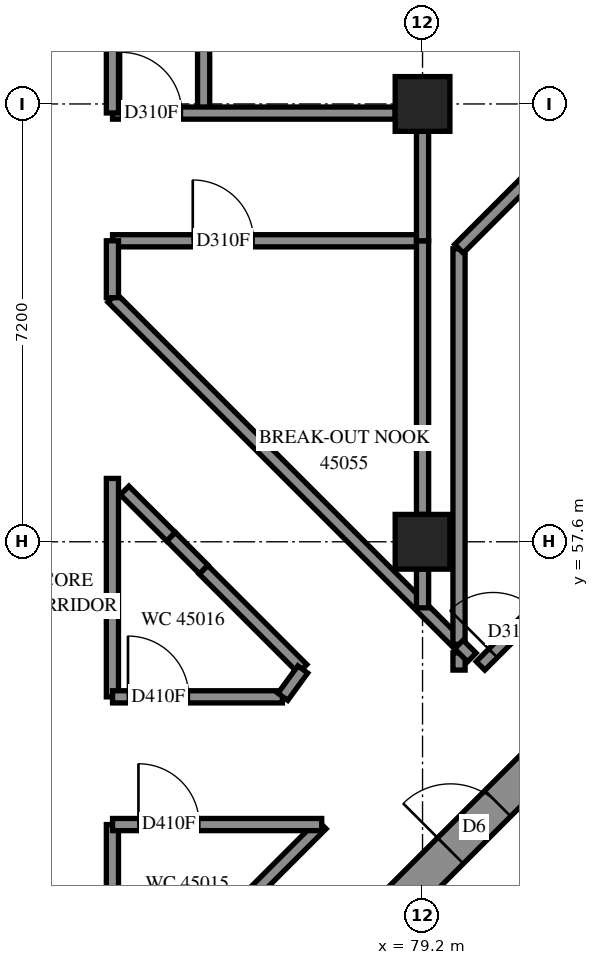
"""IFC4 building model, lengths in metres.
Left out: names, types, materials, properties, quantities, classifications, styles, units other than length and angle.
Written with IfcOpenShell. Run it as: python <this file> out.ifc"""

import sys

from ifc_helpers import new_model, si_unit, direction, frame, frame_2d, origin, origin_2d, place, context, subcontext, project, spatial, rectangle, extrude, element, fill, save


model = new_model("IFC4")
c1 = context("Model", 3, precision=1e-05, world=origin(), true_north=direction((0.0, 1.0)))
c2 = subcontext(c1, "Body", "Model", "MODEL_VIEW")
j1 = project(units=[si_unit("LENGTHUNIT", "METRE"), si_unit("PLANEANGLEUNIT", "RADIAN")], contexts=[c1])
p1 = place(None, origin())
s1 = spatial("IfcSite", under=j1, at=p1, CompositionType="ELEMENT")
p2 = place(p1, origin())
s2 = spatial("IfcBuilding", under=s1, at=p2, CompositionType="ELEMENT")
p3 = place(p2, frame((0.0, 0.0, 166.0)))
s3 = spatial("IfcBuildingStorey", under=s2, at=p3, CompositionType="ELEMENT", Elevation=166.0)
for number, where, z_axis, x_axis in (
    (1, (79.2, 57.6, 0.0), (0.0, 0.0, 1.0), (1.0, 0.0, 0.0)),
    (2, (79.2, 64.8, 0.0), (0.0, 0.0, 1.0), (1.0, 0.0, 0.0)),
):
    element("IfcColumn", number, at=place(p3, frame(where, z_axis=z_axis, x_axis=x_axis)), inside=s3, PredefinedType="COLUMN", context=c2, shape_type="SweptSolid", body=[
        extrude(rectangle(XDim=0.9, YDim=0.9, at=origin_2d()), origin(), (0.0, 0.0, 1.0), 3.1),
    ])
p4 = place(p3, frame((76.442, 49.302, -0.3), z_axis=(0.0, 0.0, 1.0), x_axis=(0.7071067812, 0.7071067812, 0.0)))
e3 = element("IfcWall", 3, at=p4, inside=s3, PredefinedType="SHEAR", context=c2, shape_type="SweptSolid", body=[
    extrude(rectangle(XDim=14.4, YDim=0.6, at=frame_2d((7.2, 0.0))), origin(), (0.0, 0.0, 1.0), 2.7),
])
p5 = place(p4, frame((4.55, 0.0, 0.3)))
e4 = element("IfcOpeningElement", 4, at=p5, cuts=e3, PredefinedType="OPENING", context=c2, shape_type="SweptSolid", body=[
    extrude(rectangle(XDim=1.1, YDim=2.1, at=frame_2d((0.55, 1.05))), frame((0.0, 0.31, 0.0), z_axis=(0.0, -1.0, 0.0), x_axis=(1.0, 0.0, 0.0)), (0.0, 0.0, 1.0), 0.62),
])
p6 = place(p4, frame((11.35, 0.0, 0.3)))
e5 = element("IfcOpeningElement", 5, at=p6, cuts=e3, PredefinedType="OPENING", context=c2, shape_type="SweptSolid", body=[
    extrude(rectangle(XDim=1.1, YDim=2.1, at=frame_2d((0.55, 1.05))), frame((0.0, 0.31, 0.0), z_axis=(0.0, -1.0, 0.0), x_axis=(1.0, 0.0, 0.0)), (0.0, 0.0, 1.0), 0.62),
])
p7 = place(p3, frame((80.154, 55.56, 0.0), z_axis=(0.0, 0.0, 1.0), x_axis=(0.7071067812, 0.7071067812, 0.0)))
e6 = element("IfcWall", 6, at=p7, inside=s3, PredefinedType="PARTITIONING", context=c2, shape_type="SweptSolid", body=[
    extrude(rectangle(XDim=9.45, YDim=0.2, at=frame_2d((4.725, 0.0))), origin(), (0.0, 0.0, 1.0), 3.1),
])
p8 = place(p7, frame((0.292, 0.0, 0.0)))
e7 = element("IfcOpeningElement", 7, at=p8, cuts=e6, PredefinedType="OPENING", context=c2, shape_type="SweptSolid", body=[
    extrude(rectangle(XDim=1.0, YDim=2.1, at=frame_2d((0.5, 1.05))), frame((0.0, 0.11, 0.0), z_axis=(0.0, -1.0, 0.0), x_axis=(1.0, 0.0, 0.0)), (0.0, 0.0, 1.0), 0.22),
])
p9 = place(p3, frame((75.6, 64.65, 0.0), z_axis=(0.0, 0.0, 1.0), x_axis=(0.0, 1.0, 0.0)))
e8 = element("IfcWall", 8, at=p9, inside=s3, PredefinedType="PARTITIONING", context=c2, shape_type="SweptSolid", body=[
    extrude(rectangle(XDim=8.16, YDim=0.2, at=frame_2d((4.08, 0.0))), origin(), (0.0, 0.0, 1.0), 3.1),
])
p10 = place(p3, frame((74.097, 61.611, 0.0), z_axis=(0.0, 0.0, 1.0), x_axis=(0.7071067812, -0.7071067812, 0.0)))
e9 = element("IfcWall", 9, at=p10, inside=s3, PredefinedType="PARTITIONING", context=c2, shape_type="SweptSolid", body=[
    extrude(rectangle(XDim=8.061, YDim=0.2, at=frame_2d((4.03, 0.0))), origin(), (0.0, 0.0, 1.0), 3.1),
])
p11 = place(p3, frame((79.8, 55.914, 0.0), z_axis=(0.0, 0.0, 1.0), x_axis=(0.0, 1.0, 0.0)))
e10 = element("IfcWall", 10, at=p11, inside=s3, PredefinedType="PARTITIONING", context=c2, shape_type="SweptSolid", body=[
    extrude(rectangle(XDim=6.504, YDim=0.2, at=frame_2d((3.252, 0.0))), origin(), (0.0, 0.0, 1.0), 3.1),
])
p12 = place(p3, frame((79.799, 62.419, 0.0), z_axis=(0.0, 0.0, 1.0), x_axis=(0.7071067812, 0.7071067812, 0.0)))
e11 = element("IfcWall", 11, at=p12, inside=s3, PredefinedType="PARTITIONING", context=c2, shape_type="SweptSolid", body=[
    extrude(rectangle(XDim=5.716, YDim=0.2, at=frame_2d((2.858, 0.0))), origin(), (0.0, 0.0, 1.0), 3.1),
])
p13 = place(p3, frame((74.102, 62.55, 0.0), z_axis=(0.0, 0.0, 1.0), x_axis=(1.0, 0.0, 0.0)))
e12 = element("IfcWall", 12, at=p13, inside=s3, PredefinedType="PARTITIONING", context=c2, shape_type="SweptSolid", body=[
    extrude(rectangle(XDim=5.098, YDim=0.2, at=frame_2d((2.549, 0.0))), origin(), (0.0, 0.0, 1.0), 3.1),
])
p14 = place(p13, frame((1.319, 0.0, 0.0)))
e13 = element("IfcOpeningElement", 13, at=p14, cuts=e12, PredefinedType="OPENING", context=c2, shape_type="SweptSolid", body=[
    extrude(rectangle(XDim=1.0, YDim=2.1, at=frame_2d((0.5, 1.05))), frame((0.0, 0.11, 0.0), z_axis=(0.0, -1.0, 0.0), x_axis=(1.0, 0.0, 0.0)), (0.0, 0.0, 1.0), 0.22),
])
p15 = place(p3, frame((74.102, 64.65, 0.0), z_axis=(0.0, 0.0, 1.0), x_axis=(1.0, 0.0, 0.0)))
e14 = element("IfcWall", 14, at=p15, inside=s3, PredefinedType="PARTITIONING", context=c2, shape_type="SweptSolid", body=[
    extrude(rectangle(XDim=4.648, YDim=0.2, at=frame_2d((2.324, 0.0))), origin(), (0.0, 0.0, 1.0), 3.1),
])
p16 = place(p15, frame((0.14, 0.0, 0.0)))
e15 = element("IfcOpeningElement", 15, at=p16, cuts=e14, PredefinedType="OPENING", context=c2, shape_type="SweptSolid", body=[
    extrude(rectangle(XDim=1.0, YDim=2.1, at=frame_2d((0.5, 1.05))), frame((0.0, 0.11, 0.0), z_axis=(0.0, -1.0, 0.0), x_axis=(1.0, 0.0, 0.0)), (0.0, 0.0, 1.0), 0.22),
])
p17 = place(p3, frame((74.3, 49.706, 0.0), z_axis=(0.0, 0.0, 1.0), x_axis=(0.7071067812, 0.7071067812, 0.0)))
e16 = element("IfcWall", 16, at=p17, inside=s3, PredefinedType="PARTITIONING", context=c2, shape_type="SweptSolid", body=[
    extrude(rectangle(XDim=4.588, YDim=0.2, at=frame_2d((2.294, 0.0))), origin(), (0.0, 0.0, 1.0), 3.1),
])
p18 = place(p3, frame((79.2, 58.05, 0.0), z_axis=(0.0, 0.0, 1.0), x_axis=(0.0, 1.0, 0.0)))
e17 = element("IfcWall", 17, at=p18, inside=s3, PredefinedType="PARTITIONING", context=c2, shape_type="SweptSolid", body=[
    extrude(rectangle(XDim=4.5, YDim=0.2, at=frame_2d((2.25, 0.0))), origin(), (0.0, 0.0, 1.0), 3.1),
])
p19 = place(p3, frame((74.1, 55.05, 0.0), z_axis=(0.0, 0.0, 1.0), x_axis=(0.0, 1.0, 0.0)))
e18 = element("IfcWall", 18, at=p19, inside=s3, PredefinedType="PARTITIONING", context=c2, shape_type="SweptSolid", body=[
    extrude(rectangle(XDim=3.592, YDim=0.2, at=frame_2d((1.796, 0.0))), origin(), (0.0, 0.0, 1.0), 3.1),
])
p20 = place(p3, frame((74.1, 49.508, 0.0), z_axis=(0.0, 0.0, 1.0), x_axis=(0.0, 1.0, 0.0)))
e19 = element("IfcWall", 19, at=p20, inside=s3, PredefinedType="PARTITIONING", context=c2, shape_type="SweptSolid", body=[
    extrude(rectangle(XDim=3.442, YDim=0.2, at=frame_2d((1.721, 0.0))), origin(), (0.0, 0.0, 1.0), 3.1),
])
p21 = place(p3, frame((74.102, 52.95, 0.0), z_axis=(0.0, 0.0, 1.0), x_axis=(1.0, 0.0, 0.0)))
e20 = element("IfcWall", 20, at=p21, inside=s3, PredefinedType="PARTITIONING", context=c2, shape_type="SweptSolid", body=[
    extrude(rectangle(XDim=3.44, YDim=0.2, at=frame_2d((1.72, 0.0))), origin(), (0.0, 0.0, 1.0), 3.1),
])
p22 = place(p21, frame((0.426, 0.0, 0.0)))
e21 = element("IfcOpeningElement", 21, at=p22, cuts=e20, PredefinedType="OPENING", context=c2, shape_type="SweptSolid", body=[
    extrude(rectangle(XDim=1.0, YDim=2.1, at=frame_2d((0.5, 1.05))), frame((0.0, 0.11, 0.0), z_axis=(0.0, -1.0, 0.0), x_axis=(1.0, 0.0, 0.0)), (0.0, 0.0, 1.0), 0.22),
])
p23 = place(p3, frame((74.102, 55.05, 0.0), z_axis=(0.0, 0.0, 1.0), x_axis=(1.0, 0.0, 0.0)))
e22 = element("IfcWall", 22, at=p23, inside=s3, PredefinedType="PARTITIONING", context=c2, shape_type="SweptSolid", body=[
    extrude(rectangle(XDim=2.794, YDim=0.2, at=frame_2d((1.397, 0.0))), origin(), (0.0, 0.0, 1.0), 3.1),
])
p24 = place(p23, frame((0.254, 0.0, 0.0)))
e23 = element("IfcOpeningElement", 23, at=p24, cuts=e22, PredefinedType="OPENING", context=c2, shape_type="SweptSolid", body=[
    extrude(rectangle(XDim=1.0, YDim=2.1, at=frame_2d((0.5, 1.05))), frame((0.0, 0.11, 0.0), z_axis=(0.0, -1.0, 0.0), x_axis=(1.0, 0.0, 0.0)), (0.0, 0.0, 1.0), 0.22),
])
p25 = place(p3, frame((75.597, 57.141, 0.0), z_axis=(0.0, 0.0, 1.0), x_axis=(0.7071067812, -0.7071067812, 0.0)))
e24 = element("IfcWall", 24, at=p25, inside=s3, PredefinedType="PARTITIONING", context=c2, shape_type="SweptSolid", body=[
    extrude(rectangle(XDim=2.305, YDim=0.2, at=frame_2d((1.153, 0.0))), origin(), (0.0, 0.0, 1.0), 3.1),
])
p26 = place(p3, frame((74.1, 64.652, 0.0), z_axis=(0.0, 0.0, 1.0), x_axis=(0.0, 1.0, 0.0)))
e25 = element("IfcWall", 25, at=p26, inside=s3, PredefinedType="PARTITIONING", context=c2, shape_type="SweptSolid", body=[
    extrude(rectangle(XDim=2.248, YDim=0.2, at=frame_2d((1.124, 0.0))), origin(), (0.0, 0.0, 1.0), 3.1),
])
p27 = place(p3, frame((79.2, 62.55, 0.0), z_axis=(0.0, 0.0, 1.0), x_axis=(0.0, 1.0, 0.0)))
e26 = element("IfcWall", 26, at=p27, inside=s3, PredefinedType="PARTITIONING", context=c2, shape_type="SweptSolid", body=[
    extrude(rectangle(XDim=1.8, YDim=0.2, at=frame_2d((0.9, 0.0))), origin(), (0.0, 0.0, 1.0), 3.1),
])
p28 = place(p3, frame((74.3, 58.444, 0.0), z_axis=(0.0, 0.0, 1.0), x_axis=(0.7080329185, -0.7061794292, 0.0)))
e27 = element("IfcWall", 27, at=p28, inside=s3, PredefinedType="PARTITIONING", context=c2, shape_type="SweptSolid", body=[
    extrude(rectangle(XDim=1.079, YDim=0.2, at=frame_2d((0.539, 0.0))), origin(), (0.0, 0.0, 1.0), 3.1),
])
p29 = place(p3, frame((74.1, 61.614, 0.0), z_axis=(0.0, 0.0, 1.0), x_axis=(0.0, 1.0, 0.0)))
e28 = element("IfcWall", 28, at=p29, inside=s3, PredefinedType="PARTITIONING", context=c2, shape_type="SweptSolid", body=[
    extrude(rectangle(XDim=0.936, YDim=0.2, at=frame_2d((0.468, 0.0))), origin(), (0.0, 0.0, 1.0), 3.1),
])
p30 = place(p3, frame((75.065, 57.683, 0.0), z_axis=(0.0, 0.0, 1.0), x_axis=(0.705788785, -0.7084223253, 0.0)))
e29 = element("IfcWall", 29, at=p30, inside=s3, PredefinedType="PARTITIONING", context=c2, shape_type="SweptSolid", body=[
    extrude(rectangle(XDim=0.759, YDim=0.2, at=frame_2d((0.38, 0.0))), origin(), (0.0, 0.0, 1.0), 3.1),
])
p31 = place(p3, frame((79.2, 56.514, 0.0), z_axis=(0.0, 0.0, 1.0), x_axis=(0.0, 1.0, 0.0)))
e30 = element("IfcWall", 30, at=p31, inside=s3, PredefinedType="PARTITIONING", context=c2, shape_type="SweptSolid", body=[
    extrude(rectangle(XDim=0.636, YDim=0.2, at=frame_2d((0.318, 0.0))), origin(), (0.0, 0.0, 1.0), 3.1),
])
p32 = place(p3, frame((76.903, 55.051, 0.0), z_axis=(0.0, 0.0, 1.0), x_axis=(0.5890255926, 0.8081143801, 0.0)))
e31 = element("IfcWall", 31, at=p32, inside=s3, PredefinedType="PARTITIONING", context=c2, shape_type="SweptSolid", body=[
    extrude(rectangle(XDim=0.557, YDim=0.2, at=frame_2d((0.278, 0.0))), origin(), (0.0, 0.0, 1.0), 3.1),
])
p33 = place(p3, frame((79.8, 55.49, 0.0), z_axis=(0.0, 0.0, 1.0), x_axis=(0.0, 1.0, 0.0)))
e32 = element("IfcWall", 32, at=p33, inside=s3, PredefinedType="PARTITIONING", context=c2, shape_type="SweptSolid", body=[
    extrude(rectangle(XDim=0.284, YDim=0.2, at=frame_2d((0.142, 0.0))), origin(), (0.0, 0.0, 1.0), 3.1),
])
p34 = place(p3, frame((79.797, 55.911, 0.0), z_axis=(0.0, 0.0, 1.0), x_axis=(0.710418702, -0.7037792749, 0.0)))
e33 = element("IfcWall", 33, at=p34, inside=s3, PredefinedType="PARTITIONING", context=c2, shape_type="SweptSolid", body=[
    extrude(rectangle(XDim=0.301, YDim=0.2, at=frame_2d((0.151, 0.0))), origin(), (0.0, 0.0, 1.0), 3.1),
])
p35 = place(p5, origin())
e34 = element("IfcDoor", 34, at=p35, inside=s3, OperationType="DOUBLE_DOOR_SINGLE_SWING", PredefinedType="DOOR", context=c2, shape_type="SweptSolid", body=[
    extrude(rectangle(XDim=1.1, YDim=2.1, at=frame_2d((0.55, 1.05))), frame((0.0, 0.025, 0.0), z_axis=(0.0, -1.0, 0.0), x_axis=(1.0, 0.0, 0.0)), (0.0, 0.0, 1.0), 0.05),
])
fill(e4, e34)
p36 = place(p22, origin())
e35 = element("IfcDoor", 35, at=p36, inside=s3, OperationType="SINGLE_SWING_RIGHT", PredefinedType="DOOR", context=c2, shape_type="SweptSolid", body=[
    extrude(rectangle(XDim=1.0, YDim=2.1, at=frame_2d((0.5, 1.05))), frame((0.0, 0.025, 0.0), z_axis=(0.0, -1.0, 0.0), x_axis=(1.0, 0.0, 0.0)), (0.0, 0.0, 1.0), 0.05),
])
fill(e21, e35)
p37 = place(p24, origin())
e36 = element("IfcDoor", 36, at=p37, inside=s3, OperationType="SINGLE_SWING_LEFT", PredefinedType="DOOR", context=c2, shape_type="SweptSolid", body=[
    extrude(rectangle(XDim=1.0, YDim=2.1, at=frame_2d((0.5, 1.05))), frame((0.0, 0.025, 0.0), z_axis=(0.0, -1.0, 0.0), x_axis=(1.0, 0.0, 0.0)), (0.0, 0.0, 1.0), 0.05),
])
fill(e23, e36)
p38 = place(p16, origin())
e37 = element("IfcDoor", 37, at=p38, inside=s3, OperationType="SINGLE_SWING_RIGHT", PredefinedType="DOOR", context=c2, shape_type="SweptSolid", body=[
    extrude(rectangle(XDim=1.0, YDim=2.1, at=frame_2d((0.5, 1.05))), frame((0.0, 0.025, 0.0), z_axis=(0.0, -1.0, 0.0), x_axis=(1.0, 0.0, 0.0)), (0.0, 0.0, 1.0), 0.05),
])
fill(e15, e37)
p39 = place(p14, origin())
e38 = element("IfcDoor", 38, at=p39, inside=s3, OperationType="SINGLE_SWING_RIGHT", PredefinedType="DOOR", context=c2, shape_type="SweptSolid", body=[
    extrude(rectangle(XDim=1.0, YDim=2.1, at=frame_2d((0.5, 1.05))), frame((0.0, 0.025, 0.0), z_axis=(0.0, -1.0, 0.0), x_axis=(1.0, 0.0, 0.0)), (0.0, 0.0, 1.0), 0.05),
])
fill(e13, e38)
p40 = place(p8, origin())
e39 = element("IfcDoor", 39, at=p40, inside=s3, OperationType="SINGLE_SWING_LEFT", PredefinedType="DOOR", context=c2, shape_type="SweptSolid", body=[
    extrude(rectangle(XDim=1.0, YDim=2.1, at=frame_2d((0.5, 1.05))), frame((0.0, 0.025, 0.0), z_axis=(0.0, -1.0, 0.0), x_axis=(1.0, 0.0, 0.0)), (0.0, 0.0, 1.0), 0.05),
])
fill(e7, e39)
save(model, sys.argv[1])
